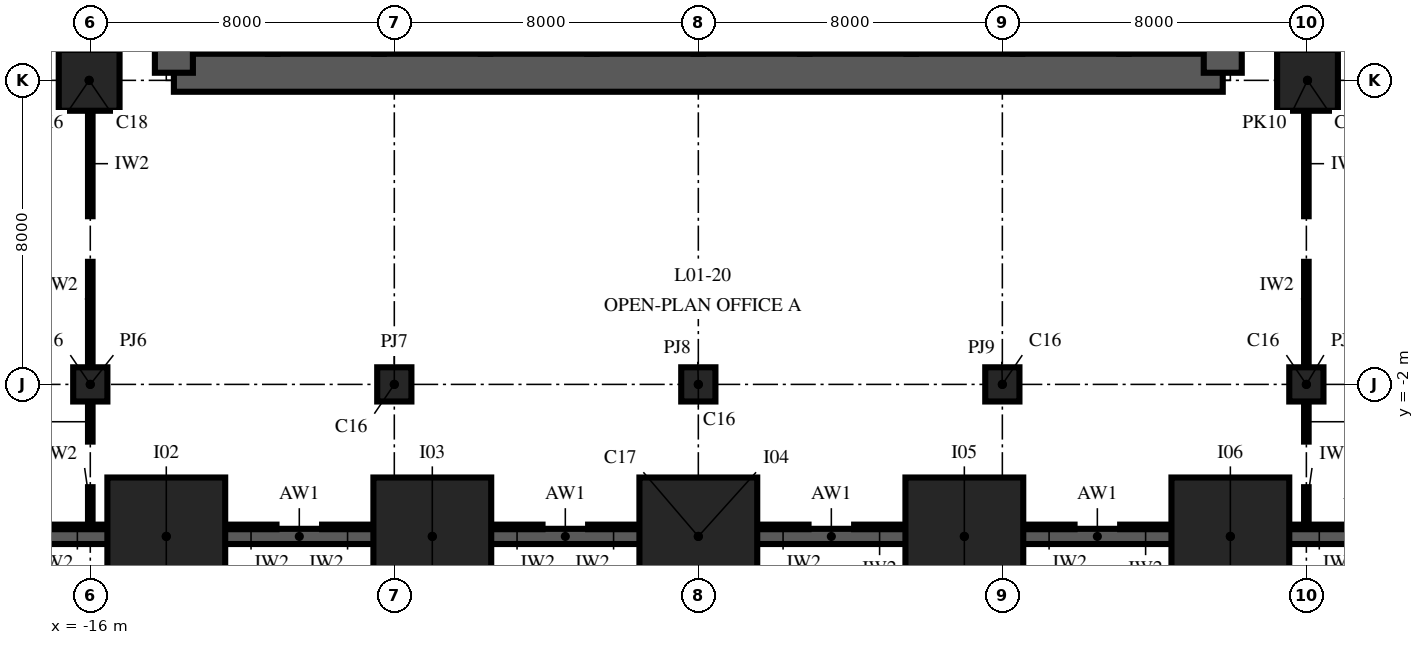
"""IFC4 building model, lengths in metres.
Left out: names, types, materials, properties, quantities, classifications, styles, units other than length and angle.
Written with IfcOpenShell. Run it as: python <this file> out.ifc"""

import sys

from ifc_helpers import new_model, si_unit, direction, frame, frame_2d, origin, origin_2d, place, context, subcontext, project, spatial, polyline, rectangle, outline, extrude, element, save


model = new_model("IFC4")
c1 = context("Model", 3, precision=1e-05, world=origin(), true_north=direction((0.0, 1.0)))
c2 = subcontext(c1, "Body", "Model", "MODEL_VIEW")
j1 = project(units=[si_unit("LENGTHUNIT", "METRE"), si_unit("PLANEANGLEUNIT", "RADIAN")], contexts=[c1])
p1 = place(None, origin())
s1 = spatial("IfcSite", under=j1, at=p1, CompositionType="ELEMENT")
p2 = place(p1, origin())
s2 = spatial("IfcBuilding", under=s1, at=p2, CompositionType="ELEMENT")
p3 = place(p2, frame((0.0, 0.0, 6.0)))
s3 = spatial("IfcBuildingStorey", under=s2, at=p3, CompositionType="ELEMENT", Elevation=6.0)
for number, where, z_axis, x_axis in (
    (1, (-14.0, -6.0, 0.0), (0.0, 0.0, 1.0), (1.0, 0.0, 0.0)),
    (2, (-7.0, -6.0, 0.0), (0.0, 0.0, 1.0), (1.0, 0.0, 0.0)),
    (3, (0.0, -6.0, 0.0), (0.0, 0.0, 1.0), (1.0, 0.0, 0.0)),
    (4, (7.0, -6.0, 0.0), (0.0, 0.0, 1.0), (1.0, 0.0, 0.0)),
    (5, (14.0, -6.0, 0.0), (0.0, 0.0, 1.0), (1.0, 0.0, 0.0)),
):
    element("IfcColumn", number, at=place(p3, frame(where, z_axis=z_axis, x_axis=x_axis)), inside=s3, PredefinedType="COLUMN", context=c2, shape_type="SweptSolid", body=[
        extrude(rectangle(XDim=3.1, YDim=3.1, at=origin_2d()), origin(), (0.0, 0.0, 1.0), 6.0),
    ])
p4 = place(p3, frame((-16.0, -2.0, 0.0), z_axis=(0.0, 0.0, 1.0), x_axis=(1.0, 0.0, 0.0)))
e6 = element("IfcColumn", 6, at=p4, inside=s3, PredefinedType="COLUMN", context=c2, shape_type="SweptSolid", body=[
    extrude(rectangle(XDim=0.9, YDim=0.9, at=origin_2d()), origin(), (0.0, 0.0, 1.0), 6.0),
])
p5 = place(p3, frame((-16.03, 6.0, 0.0), z_axis=(0.0, 0.0, 1.0), x_axis=(1.0, 0.0, 0.0)))
e7 = element("IfcColumn", 7, at=p5, inside=s3, PredefinedType="COLUMN", context=c2, shape_type="SweptSolid", body=[
    extrude(rectangle(XDim=1.6, YDim=1.6, at=origin_2d()), origin(), (0.0, 0.0, 1.0), 6.0),
])
for number, where, z_axis, x_axis in (
    (8, (-8.0, -2.0, 0.0), (0.0, 0.0, 1.0), (1.0, 0.0, 0.0)),
    (9, (0.0, -2.0, 0.0), (0.0, 0.0, 1.0), (1.0, 0.0, 0.0)),
    (10, (8.0, -2.0, 0.0), (0.0, 0.0, 1.0), (1.0, 0.0, 0.0)),
    (11, (16.0, -2.0, 0.0), (0.0, 0.0, 1.0), (1.0, 0.0, 0.0)),
):
    element("IfcColumn", number, at=place(p3, frame(where, z_axis=z_axis, x_axis=x_axis)), inside=s3, PredefinedType="COLUMN", context=c2, shape_type="SweptSolid", body=[
        extrude(rectangle(XDim=0.9, YDim=0.9, at=origin_2d()), origin(), (0.0, 0.0, 1.0), 6.0),
    ])
p6 = place(p3, frame((16.03, 6.0, 0.0), z_axis=(0.0, 0.0, 1.0), x_axis=(1.0, 0.0, 0.0)))
e12 = element("IfcColumn", 12, at=p6, inside=s3, PredefinedType="COLUMN", context=c2, shape_type="SweptSolid", body=[
    extrude(rectangle(XDim=1.6, YDim=1.6, at=origin_2d()), origin(), (0.0, 0.0, 1.0), 6.0),
])
p7 = place(p3, frame((-13.8, 6.2, 0.0), z_axis=(0.0, 0.0, 1.0), x_axis=(1.0, 0.0, 0.0)))
e13 = element("IfcWall", 13, at=p7, inside=s3, PredefinedType="SHEAR", context=c2, shape_type="SweptSolid", body=[
    extrude(rectangle(XDim=27.6, YDim=1.0, at=frame_2d((13.8, 0.0))), origin(), (0.0, 0.0, 1.0), 6.0),
])
p8 = place(p3, frame((13.8, 6.2, 0.0), z_axis=(0.0, 0.0, 1.0), x_axis=(0.0, 1.0, 0.0)))
e14 = element("IfcWall", 14, at=p8, inside=s3, PredefinedType="SHEAR", context=c2, shape_type="SweptSolid", body=[
    extrude(outline(polyline([(0.0, -0.5), (17.6, -0.5), (17.6, 0.0), (17.1, 0.0), (17.1, 0.5), (0.5, 0.5), (0.5, 0.0), (0.0, 0.0), (0.0, -0.5)])), origin(), (0.0, 0.0, 1.0), 6.0),
])
p9 = place(p8, frame((4.1, 0.0, 0.0)))
e15 = element("IfcOpeningElement", 15, at=p9, cuts=e14, PredefinedType="OPENING", context=c2, shape_type="SweptSolid", body=[
    extrude(rectangle(XDim=1.8, YDim=2.4, at=frame_2d((0.9, 1.2))), frame((0.0, 0.515, 0.0), z_axis=(0.0, -1.0, 0.0), x_axis=(1.0, 0.0, 0.0)), (0.0, 0.0, 1.0), 1.03),
])
p10 = place(p3, frame((-13.8, 23.8, 0.0), z_axis=(0.0, 0.0, 1.0), x_axis=(0.0, -1.0, 0.0)))
e16 = element("IfcWall", 16, at=p10, inside=s3, PredefinedType="SHEAR", context=c2, shape_type="SweptSolid", body=[
    extrude(outline(polyline([(0.0, -0.5), (17.6, -0.5), (17.6, 0.0), (17.1, 0.0), (17.1, 0.5), (0.5, 0.5), (0.5, 0.0), (0.0, 0.0), (0.0, -0.5)])), origin(), (0.0, 0.0, 1.0), 6.0),
])
p11 = place(p10, frame((11.7, 0.0, 0.0)))
e17 = element("IfcOpeningElement", 17, at=p11, cuts=e16, PredefinedType="OPENING", context=c2, shape_type="SweptSolid", body=[
    extrude(rectangle(XDim=1.8, YDim=2.4, at=frame_2d((0.9, 1.2))), frame((0.0, 0.515, 0.0), z_axis=(0.0, -1.0, 0.0), x_axis=(1.0, 0.0, 0.0)), (0.0, 0.0, 1.0), 1.03),
])
for number, where, z_axis, x_axis in (
    (18, (-11.2, 6.7, 0.0), (0.0, 0.0, 1.0), (0.0, 1.0, 0.0)),
    (19, (-8.4, 6.7, 0.0), (0.0, 0.0, 1.0), (0.0, 1.0, 0.0)),
    (20, (-5.6, 6.7, 0.0), (0.0, 0.0, 1.0), (0.0, 1.0, 0.0)),
    (21, (-2.8, 6.7, 0.0), (0.0, 0.0, 1.0), (0.0, 1.0, 0.0)),
    (22, (0.0, 6.7, 0.0), (0.0, 0.0, 1.0), (0.0, 1.0, 0.0)),
    (23, (2.8, 6.7, 0.0), (0.0, 0.0, 1.0), (0.0, 1.0, 0.0)),
    (24, (5.6, 6.7, 0.0), (0.0, 0.0, 1.0), (0.0, 1.0, 0.0)),
    (25, (8.4, 6.7, 0.0), (0.0, 0.0, 1.0), (0.0, 1.0, 0.0)),
    (26, (11.2, 6.7, 0.0), (0.0, 0.0, 1.0), (0.0, 1.0, 0.0)),
):
    element("IfcWall", number, at=place(p3, frame(where, z_axis=z_axis, x_axis=x_axis)), inside=s3, PredefinedType="SHEAR", context=c2, shape_type="SweptSolid", body=[
        extrude(rectangle(XDim=2.575, YDim=0.25, at=frame_2d((1.288, 0.0))), origin(), (0.0, 0.0, 1.0), 6.0),
    ])
for number, where, z_axis, x_axis in (
    (27, (-20.35, -6.0, 0.0), (0.0, 0.0, 1.0), (1.0, 0.0, 0.0)),
    (28, (-13.35, -6.0, 0.0), (0.0, 0.0, 1.0), (1.0, 0.0, 0.0)),
    (29, (-6.35, -6.0, 0.0), (0.0, 0.0, 1.0), (1.0, 0.0, 0.0)),
    (30, (0.65, -6.0, 0.0), (0.0, 0.0, 1.0), (1.0, 0.0, 0.0)),
    (31, (7.65, -6.0, 0.0), (0.0, 0.0, 1.0), (1.0, 0.0, 0.0)),
    (32, (14.65, -6.0, 0.0), (0.0, 0.0, 1.0), (1.0, 0.0, 0.0)),
):
    element("IfcWall", number, at=place(p3, frame(where, z_axis=z_axis, x_axis=x_axis)), inside=s3, PredefinedType="SHEAR", context=c2, shape_type="SweptSolid", body=[
        extrude(rectangle(XDim=5.7, YDim=0.4, at=frame_2d((2.85, 0.0))), origin(), (0.0, 0.0, 1.0), 6.0),
    ])
for number, where, z_axis, x_axis in (
    (33, (-16.0, -5.75, 0.0), (0.0, 0.0, 1.0), (0.0, 1.0, 0.0)),
    (34, (-16.0, -3.505, 0.0), (0.0, 0.0, 1.0), (0.0, 1.0, 0.0)),
):
    element("IfcWall", number, at=place(p3, frame(where, z_axis=z_axis, x_axis=x_axis)), inside=s3, PredefinedType="PARTITIONING", context=c2, shape_type="SweptSolid", body=[
        extrude(rectangle(XDim=1.045, YDim=0.12, at=frame_2d((0.522, 0.0))), origin(), (0.0, 0.0, 1.0), 5.7),
    ])
p12 = place(p3, frame((-16.0, -1.54, 0.0), z_axis=(0.0, 0.0, 1.0), x_axis=(0.0, 1.0, 0.0)))
e35 = element("IfcWall", 35, at=p12, inside=s3, PredefinedType="PARTITIONING", context=c2, shape_type="SweptSolid", body=[
    extrude(rectangle(XDim=2.765, YDim=0.12, at=frame_2d((1.383, 0.0))), origin(), (0.0, 0.0, 1.0), 5.05),
])
p13 = place(p3, frame((-16.0, 2.425, 0.0), z_axis=(0.0, 0.0, 1.0), x_axis=(0.0, 1.0, 0.0)))
e36 = element("IfcWall", 36, at=p13, inside=s3, PredefinedType="PARTITIONING", context=c2, shape_type="SweptSolid", body=[
    extrude(rectangle(XDim=2.765, YDim=0.12, at=frame_2d((1.382, 0.0))), origin(), (0.0, 0.0, 1.0), 5.05),
])
for number, where, z_axis, x_axis in (
    (37, (16.0, -5.75, 0.0), (0.0, 0.0, 1.0), (0.0, 1.0, 0.0)),
    (38, (16.0, -3.505, 0.0), (0.0, 0.0, 1.0), (0.0, 1.0, 0.0)),
):
    element("IfcWall", number, at=place(p3, frame(where, z_axis=z_axis, x_axis=x_axis)), inside=s3, PredefinedType="PARTITIONING", context=c2, shape_type="SweptSolid", body=[
        extrude(rectangle(XDim=1.045, YDim=0.12, at=frame_2d((0.522, 0.0))), origin(), (0.0, 0.0, 1.0), 5.7),
    ])
p14 = place(p3, frame((16.0, -1.54, 0.0), z_axis=(0.0, 0.0, 1.0), x_axis=(0.0, 1.0, 0.0)))
e39 = element("IfcWall", 39, at=p14, inside=s3, PredefinedType="PARTITIONING", context=c2, shape_type="SweptSolid", body=[
    extrude(rectangle(XDim=2.765, YDim=0.12, at=frame_2d((1.383, 0.0))), origin(), (0.0, 0.0, 1.0), 5.05),
])
p15 = place(p3, frame((16.0, 2.425, 0.0), z_axis=(0.0, 0.0, 1.0), x_axis=(0.0, 1.0, 0.0)))
e40 = element("IfcWall", 40, at=p15, inside=s3, PredefinedType="PARTITIONING", context=c2, shape_type="SweptSolid", body=[
    extrude(rectangle(XDim=2.765, YDim=0.12, at=frame_2d((1.382, 0.0))), origin(), (0.0, 0.0, 1.0), 5.05),
])
p16 = place(p3, frame((-17.12, -5.75, 0.0), z_axis=(0.0, 0.0, 1.0), x_axis=(1.0, 0.0, 0.0)))
e41 = element("IfcWall", 41, at=p16, inside=s3, PredefinedType="PARTITIONING", context=c2, shape_type="SweptSolid", body=[
    extrude(rectangle(XDim=1.56, YDim=0.12, at=frame_2d((0.78, 0.0))), origin(), (0.0, 0.0, 1.0), 5.7),
])
for number, where, z_axis, x_axis in (
    (42, (-12.44, -5.75, 0.0), (0.0, 0.0, 1.0), (1.0, 0.0, 0.0)),
    (43, (-9.9, -5.75, 0.0), (0.0, 0.0, 1.0), (1.0, 0.0, 0.0)),
    (44, (-5.44, -5.75, 0.0), (0.0, 0.0, 1.0), (1.0, 0.0, 0.0)),
    (45, (-2.9, -5.75, 0.0), (0.0, 0.0, 1.0), (1.0, 0.0, 0.0)),
    (46, (1.56, -5.75, 0.0), (0.0, 0.0, 1.0), (1.0, 0.0, 0.0)),
    (47, (4.1, -5.75, 0.0), (0.0, 0.0, 1.0), (1.0, 0.0, 0.0)),
    (48, (8.56, -5.75, 0.0), (0.0, 0.0, 1.0), (1.0, 0.0, 0.0)),
    (49, (11.1, -5.75, 0.0), (0.0, 0.0, 1.0), (1.0, 0.0, 0.0)),
):
    element("IfcWall", number, at=place(p3, frame(where, z_axis=z_axis, x_axis=x_axis)), inside=s3, PredefinedType="PARTITIONING", context=c2, shape_type="SweptSolid", body=[
        extrude(rectangle(XDim=1.34, YDim=0.12, at=frame_2d((0.67, 0.0))), origin(), (0.0, 0.0, 1.0), 5.7),
    ])
p17 = place(p3, frame((15.56, -5.75, 0.0), z_axis=(0.0, 0.0, 1.0), x_axis=(1.0, 0.0, 0.0)))
e50 = element("IfcWall", 50, at=p17, inside=s3, PredefinedType="PARTITIONING", context=c2, shape_type="SweptSolid", body=[
    extrude(rectangle(XDim=1.56, YDim=0.12, at=frame_2d((0.78, 0.0))), origin(), (0.0, 0.0, 1.0), 5.7),
])
save(model, sys.argv[1])
